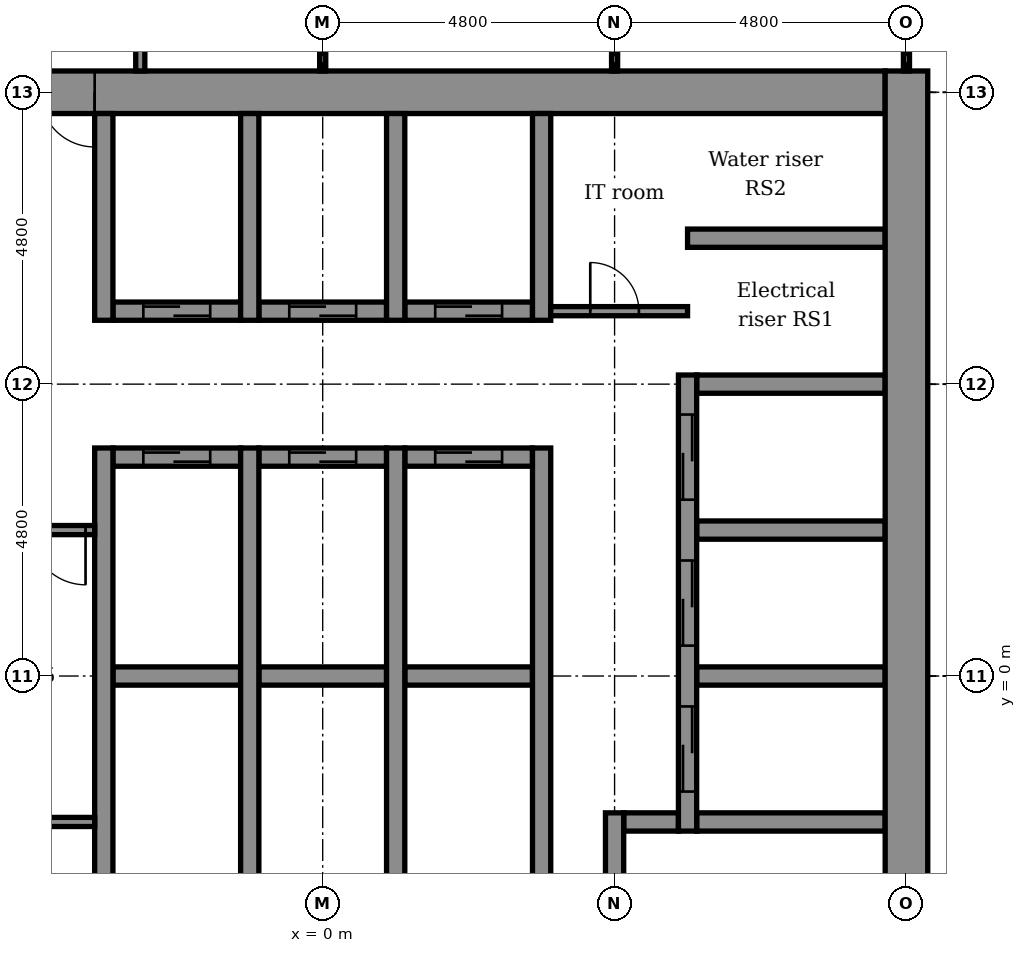
"""IFC4 building model, lengths in metres.
Left out: names, types, materials, properties, quantities, classifications, styles, units other than length and angle.
Written with IfcOpenShell. Run it as: python <this file> out.ifc"""

import sys

from ifc_helpers import new_model, si_unit, direction, frame, frame_2d, origin, place, context, subcontext, project, spatial, rectangle, extrude, element, fill, save


model = new_model("IFC4")
c1 = context("Model", 3, precision=1e-05, world=origin(), true_north=direction((0.0, 1.0)))
c2 = subcontext(c1, "Body", "Model", "MODEL_VIEW")
j1 = project(units=[si_unit("LENGTHUNIT", "METRE"), si_unit("PLANEANGLEUNIT", "RADIAN")], contexts=[c1])
p1 = place(None, origin())
s1 = spatial("IfcSite", under=j1, at=p1, CompositionType="ELEMENT")
p2 = place(p1, origin())
s2 = spatial("IfcBuilding", under=s1, at=p2, CompositionType="ELEMENT")
p3 = place(p2, frame((0.0, 0.0, 212.9)))
s3 = spatial("IfcBuildingStorey", under=s2, at=p3, CompositionType="ELEMENT", Elevation=212.9)
p4 = place(p3, frame((4.95, -2.4, -0.15), z_axis=(0.0, 0.0, 1.0), x_axis=(1.0, 0.0, 0.0)))
e1 = element("IfcWall", 1, at=p4, inside=s3, PredefinedType="STANDARD", context=c2, shape_type="SweptSolid", body=[
    extrude(rectangle(XDim=0.9, YDim=0.3, at=frame_2d((0.45, 0.0))), origin(), (0.0, 0.0, 1.0), 3.75),
])
p5 = place(p3, frame((6.15, -2.4, -0.15), z_axis=(0.0, 0.0, 1.0), x_axis=(1.0, 0.0, 0.0)))
e2 = element("IfcWall", 2, at=p5, inside=s3, PredefinedType="STANDARD", context=c2, shape_type="SweptSolid", body=[
    extrude(rectangle(XDim=3.1, YDim=0.3, at=frame_2d((1.55, 0.0))), origin(), (0.0, 0.0, 1.0), 3.75),
])
p6 = place(p3, frame((-3.45, 0.0, -0.15), z_axis=(0.0, 0.0, 1.0), x_axis=(1.0, 0.0, 0.0)))
e3 = element("IfcWall", 3, at=p6, inside=s3, PredefinedType="STANDARD", context=c2, shape_type="SweptSolid", body=[
    extrude(rectangle(XDim=2.1, YDim=0.3, at=frame_2d((1.05, 0.0))), origin(), (0.0, 0.0, 1.0), 3.75),
])
p7 = place(p3, frame((-1.05, 0.0, -0.15), z_axis=(0.0, 0.0, 1.0), x_axis=(1.0, 0.0, 0.0)))
e4 = element("IfcWall", 4, at=p7, inside=s3, PredefinedType="STANDARD", context=c2, shape_type="SweptSolid", body=[
    extrude(rectangle(XDim=2.1, YDim=0.3, at=frame_2d((1.05, 0.0))), origin(), (0.0, 0.0, 1.0), 3.75),
])
p8 = place(p3, frame((1.35, 0.0, -0.15), z_axis=(0.0, 0.0, 1.0), x_axis=(1.0, 0.0, 0.0)))
e5 = element("IfcWall", 5, at=p8, inside=s3, PredefinedType="STANDARD", context=c2, shape_type="SweptSolid", body=[
    extrude(rectangle(XDim=2.1, YDim=0.3, at=frame_2d((1.05, 0.0))), origin(), (0.0, 0.0, 1.0), 3.75),
])
for number, where, z_axis, x_axis in (
    (6, (6.15, 0.0, -0.15), (0.0, 0.0, 1.0), (1.0, 0.0, 0.0)),
    (7, (6.15, 2.4, -0.15), (0.0, 0.0, 1.0), (1.0, 0.0, 0.0)),
):
    element("IfcWall", number, at=place(p3, frame(where, z_axis=z_axis, x_axis=x_axis)), inside=s3, PredefinedType="STANDARD", context=c2, shape_type="SweptSolid", body=[
        extrude(rectangle(XDim=3.1, YDim=0.3, at=frame_2d((1.55, 0.0))), origin(), (0.0, 0.0, 1.0), 3.75),
    ])
p9 = place(p3, frame((-3.45, 3.6, -0.15), z_axis=(0.0, 0.0, 1.0), x_axis=(1.0, 0.0, 0.0)))
e8 = element("IfcWall", 8, at=p9, inside=s3, PredefinedType="STANDARD", context=c2, shape_type="SweptSolid", body=[
    extrude(rectangle(XDim=2.1, YDim=0.3, at=frame_2d((1.05, 0.0))), origin(), (0.0, 0.0, 1.0), 3.75),
])
p10 = place(p9, frame((0.5, 0.0, 0.15)))
e9 = element("IfcOpeningElement", 9, at=p10, cuts=e8, PredefinedType="OPENING", context=c2, shape_type="SweptSolid", body=[
    extrude(rectangle(XDim=1.1, YDim=2.1, at=frame_2d((0.55, 1.05))), frame((0.0, 0.16, 0.0), z_axis=(0.0, -1.0, 0.0), x_axis=(1.0, 0.0, 0.0)), (0.0, 0.0, 1.0), 0.32),
])
p11 = place(p3, frame((-1.05, 3.6, -0.15), z_axis=(0.0, 0.0, 1.0), x_axis=(1.0, 0.0, 0.0)))
e10 = element("IfcWall", 10, at=p11, inside=s3, PredefinedType="STANDARD", context=c2, shape_type="SweptSolid", body=[
    extrude(rectangle(XDim=2.1, YDim=0.3, at=frame_2d((1.05, 0.0))), origin(), (0.0, 0.0, 1.0), 3.75),
])
p12 = place(p11, frame((0.5, 0.0, 0.15)))
e11 = element("IfcOpeningElement", 11, at=p12, cuts=e10, PredefinedType="OPENING", context=c2, shape_type="SweptSolid", body=[
    extrude(rectangle(XDim=1.1, YDim=2.1, at=frame_2d((0.55, 1.05))), frame((0.0, 0.16, 0.0), z_axis=(0.0, -1.0, 0.0), x_axis=(1.0, 0.0, 0.0)), (0.0, 0.0, 1.0), 0.32),
])
p13 = place(p3, frame((1.35, 3.6, -0.15), z_axis=(0.0, 0.0, 1.0), x_axis=(1.0, 0.0, 0.0)))
e12 = element("IfcWall", 12, at=p13, inside=s3, PredefinedType="STANDARD", context=c2, shape_type="SweptSolid", body=[
    extrude(rectangle(XDim=2.1, YDim=0.3, at=frame_2d((1.05, 0.0))), origin(), (0.0, 0.0, 1.0), 3.75),
])
p14 = place(p13, frame((0.5, 0.0, 0.15)))
e13 = element("IfcOpeningElement", 13, at=p14, cuts=e12, PredefinedType="OPENING", context=c2, shape_type="SweptSolid", body=[
    extrude(rectangle(XDim=1.1, YDim=2.1, at=frame_2d((0.55, 1.05))), frame((0.0, 0.16, 0.0), z_axis=(0.0, -1.0, 0.0), x_axis=(1.0, 0.0, 0.0)), (0.0, 0.0, 1.0), 0.32),
])
p15 = place(p3, frame((6.15, 4.8, -0.15), z_axis=(0.0, 0.0, 1.0), x_axis=(1.0, 0.0, 0.0)))
e14 = element("IfcWall", 14, at=p15, inside=s3, PredefinedType="STANDARD", context=c2, shape_type="SweptSolid", body=[
    extrude(rectangle(XDim=3.1, YDim=0.3, at=frame_2d((1.55, 0.0))), origin(), (0.0, 0.0, 1.0), 3.75),
])
p16 = place(p3, frame((-3.45, 6.0, -0.15), z_axis=(0.0, 0.0, 1.0), x_axis=(1.0, 0.0, 0.0)))
e15 = element("IfcWall", 15, at=p16, inside=s3, PredefinedType="STANDARD", context=c2, shape_type="SweptSolid", body=[
    extrude(rectangle(XDim=2.1, YDim=0.3, at=frame_2d((1.05, 0.0))), origin(), (0.0, 0.0, 1.0), 3.75),
])
p17 = place(p16, frame((0.5, 0.0, 0.15)))
e16 = element("IfcOpeningElement", 16, at=p17, cuts=e15, PredefinedType="OPENING", context=c2, shape_type="SweptSolid", body=[
    extrude(rectangle(XDim=1.1, YDim=2.1, at=frame_2d((0.55, 1.05))), frame((0.0, 0.16, 0.0), z_axis=(0.0, -1.0, 0.0), x_axis=(1.0, 0.0, 0.0)), (0.0, 0.0, 1.0), 0.32),
])
p18 = place(p3, frame((-1.05, 6.0, -0.15), z_axis=(0.0, 0.0, 1.0), x_axis=(1.0, 0.0, 0.0)))
e17 = element("IfcWall", 17, at=p18, inside=s3, PredefinedType="STANDARD", context=c2, shape_type="SweptSolid", body=[
    extrude(rectangle(XDim=2.1, YDim=0.3, at=frame_2d((1.05, 0.0))), origin(), (0.0, 0.0, 1.0), 3.75),
])
p19 = place(p18, frame((0.5, 0.0, 0.15)))
e18 = element("IfcOpeningElement", 18, at=p19, cuts=e17, PredefinedType="OPENING", context=c2, shape_type="SweptSolid", body=[
    extrude(rectangle(XDim=1.1, YDim=2.1, at=frame_2d((0.55, 1.05))), frame((0.0, 0.16, 0.0), z_axis=(0.0, -1.0, 0.0), x_axis=(1.0, 0.0, 0.0)), (0.0, 0.0, 1.0), 0.32),
])
p20 = place(p3, frame((1.35, 6.0, -0.15), z_axis=(0.0, 0.0, 1.0), x_axis=(1.0, 0.0, 0.0)))
e19 = element("IfcWall", 19, at=p20, inside=s3, PredefinedType="STANDARD", context=c2, shape_type="SweptSolid", body=[
    extrude(rectangle(XDim=2.1, YDim=0.3, at=frame_2d((1.05, 0.0))), origin(), (0.0, 0.0, 1.0), 3.75),
])
p21 = place(p20, frame((0.5, 0.0, 0.15)))
e20 = element("IfcOpeningElement", 20, at=p21, cuts=e19, PredefinedType="OPENING", context=c2, shape_type="SweptSolid", body=[
    extrude(rectangle(XDim=1.1, YDim=2.1, at=frame_2d((0.55, 1.05))), frame((0.0, 0.16, 0.0), z_axis=(0.0, -1.0, 0.0), x_axis=(1.0, 0.0, 0.0)), (0.0, 0.0, 1.0), 0.32),
])
p22 = place(p3, frame((6.0, 7.2, -0.15), z_axis=(0.0, 0.0, 1.0), x_axis=(1.0, 0.0, 0.0)))
e21 = element("IfcWall", 21, at=p22, inside=s3, PredefinedType="STANDARD", context=c2, shape_type="SweptSolid", body=[
    extrude(rectangle(XDim=3.25, YDim=0.3, at=frame_2d((1.625, 0.0))), origin(), (0.0, 0.0, 1.0), 3.75),
])
p23 = place(p3, frame((-5.25, 9.6, -0.15), z_axis=(0.0, 0.0, 1.0), x_axis=(1.0, 0.0, 0.0)))
e22 = element("IfcWall", 22, at=p23, inside=s3, PredefinedType="SHEAR", context=c2, shape_type="SweptSolid", body=[
    extrude(rectangle(XDim=14.5, YDim=0.7, at=frame_2d((7.25, 0.0))), origin(), (0.0, 0.0, 1.0), 3.75),
])
p24 = place(p23, frame((0.6, 0.0, 0.15)))
e23 = element("IfcOpeningElement", 23, at=p24, cuts=e22, PredefinedType="OPENING", context=c2, shape_type="SweptSolid", body=[
    extrude(rectangle(XDim=0.9, YDim=2.1, at=frame_2d((0.45, 1.05))), frame((0.0, 0.36, 0.0), z_axis=(0.0, -1.0, 0.0), x_axis=(1.0, 0.0, 0.0)), (0.0, 0.0, 1.0), 0.72),
])
p25 = place(p3, frame((-3.6, -3.75, -0.15), z_axis=(0.0, 0.0, 1.0), x_axis=(0.0, 1.0, 0.0)))
e24 = element("IfcWall", 24, at=p25, inside=s3, PredefinedType="STANDARD", context=c2, shape_type="SweptSolid", body=[
    extrude(rectangle(XDim=7.5, YDim=0.3, at=frame_2d((3.75, 0.0))), origin(), (0.0, 0.0, 1.0), 3.75),
])
p26 = place(p3, frame((-3.6, 5.85, -0.15), z_axis=(0.0, 0.0, 1.0), x_axis=(0.0, 1.0, 0.0)))
e25 = element("IfcWall", 25, at=p26, inside=s3, PredefinedType="STANDARD", context=c2, shape_type="SweptSolid", body=[
    extrude(rectangle(XDim=3.4, YDim=0.3, at=frame_2d((1.7, 0.0))), origin(), (0.0, 0.0, 1.0), 3.75),
])
p27 = place(p3, frame((-1.2, -3.75, -0.15), z_axis=(0.0, 0.0, 1.0), x_axis=(0.0, 1.0, 0.0)))
e26 = element("IfcWall", 26, at=p27, inside=s3, PredefinedType="STANDARD", context=c2, shape_type="SweptSolid", body=[
    extrude(rectangle(XDim=7.5, YDim=0.3, at=frame_2d((3.75, 0.0))), origin(), (0.0, 0.0, 1.0), 3.75),
])
p28 = place(p3, frame((-1.2, 5.85, -0.15), z_axis=(0.0, 0.0, 1.0), x_axis=(0.0, 1.0, 0.0)))
e27 = element("IfcWall", 27, at=p28, inside=s3, PredefinedType="STANDARD", context=c2, shape_type="SweptSolid", body=[
    extrude(rectangle(XDim=3.4, YDim=0.3, at=frame_2d((1.7, 0.0))), origin(), (0.0, 0.0, 1.0), 3.75),
])
p29 = place(p3, frame((1.2, -3.75, -0.15), z_axis=(0.0, 0.0, 1.0), x_axis=(0.0, 1.0, 0.0)))
e28 = element("IfcWall", 28, at=p29, inside=s3, PredefinedType="STANDARD", context=c2, shape_type="SweptSolid", body=[
    extrude(rectangle(XDim=7.5, YDim=0.3, at=frame_2d((3.75, 0.0))), origin(), (0.0, 0.0, 1.0), 3.75),
])
p30 = place(p3, frame((1.2, 5.85, -0.15), z_axis=(0.0, 0.0, 1.0), x_axis=(0.0, 1.0, 0.0)))
e29 = element("IfcWall", 29, at=p30, inside=s3, PredefinedType="STANDARD", context=c2, shape_type="SweptSolid", body=[
    extrude(rectangle(XDim=3.4, YDim=0.3, at=frame_2d((1.7, 0.0))), origin(), (0.0, 0.0, 1.0), 3.75),
])
p31 = place(p3, frame((3.6, -3.75, -0.15), z_axis=(0.0, 0.0, 1.0), x_axis=(0.0, 1.0, 0.0)))
e30 = element("IfcWall", 30, at=p31, inside=s3, PredefinedType="STANDARD", context=c2, shape_type="SweptSolid", body=[
    extrude(rectangle(XDim=7.5, YDim=0.3, at=frame_2d((3.75, 0.0))), origin(), (0.0, 0.0, 1.0), 3.75),
])
p32 = place(p3, frame((3.6, 5.85, -0.15), z_axis=(0.0, 0.0, 1.0), x_axis=(0.0, 1.0, 0.0)))
e31 = element("IfcWall", 31, at=p32, inside=s3, PredefinedType="STANDARD", context=c2, shape_type="SweptSolid", body=[
    extrude(rectangle(XDim=3.4, YDim=0.3, at=frame_2d((1.7, 0.0))), origin(), (0.0, 0.0, 1.0), 3.75),
])
p33 = place(p3, frame((4.8, -9.25, -0.15), z_axis=(0.0, 0.0, 1.0), x_axis=(0.0, 1.0, 0.0)))
e32 = element("IfcWall", 32, at=p33, inside=s3, PredefinedType="STANDARD", context=c2, shape_type="SweptSolid", body=[
    extrude(rectangle(XDim=7.0, YDim=0.3, at=frame_2d((3.5, 0.0))), origin(), (0.0, 0.0, 1.0), 3.75),
])
p34 = place(p33, frame((3.8, 0.0, 0.15)))
e33 = element("IfcOpeningElement", 33, at=p34, cuts=e32, PredefinedType="OPENING", context=c2, shape_type="SweptSolid", body=[
    extrude(rectangle(XDim=1.2, YDim=2.1, at=frame_2d((0.6, 1.05))), frame((0.0, 0.16, 0.0), z_axis=(0.0, -1.0, 0.0), x_axis=(1.0, 0.0, 0.0)), (0.0, 0.0, 1.0), 0.32),
])
p35 = place(p3, frame((6.0, -2.55, -0.15), z_axis=(0.0, 0.0, 1.0), x_axis=(0.0, 1.0, 0.0)))
e34 = element("IfcWall", 34, at=p35, inside=s3, PredefinedType="STANDARD", context=c2, shape_type="SweptSolid", body=[
    extrude(rectangle(XDim=7.5, YDim=0.3, at=frame_2d((3.75, 0.0))), origin(), (0.0, 0.0, 1.0), 3.75),
])
p36 = place(p35, frame((0.65, 0.0, 0.15)))
e35 = element("IfcOpeningElement", 35, at=p36, cuts=e34, PredefinedType="OPENING", context=c2, shape_type="SweptSolid", body=[
    extrude(rectangle(XDim=1.4, YDim=2.1, at=frame_2d((0.7, 1.05))), frame((0.0, 0.16, 0.0), z_axis=(0.0, -1.0, 0.0), x_axis=(1.0, 0.0, 0.0)), (0.0, 0.0, 1.0), 0.32),
])
p37 = place(p35, frame((3.05, 0.0, 0.15)))
e36 = element("IfcOpeningElement", 36, at=p37, cuts=e34, PredefinedType="OPENING", context=c2, shape_type="SweptSolid", body=[
    extrude(rectangle(XDim=1.4, YDim=2.1, at=frame_2d((0.7, 1.05))), frame((0.0, 0.16, 0.0), z_axis=(0.0, -1.0, 0.0), x_axis=(1.0, 0.0, 0.0)), (0.0, 0.0, 1.0), 0.32),
])
p38 = place(p35, frame((5.45, 0.0, 0.15)))
e37 = element("IfcOpeningElement", 37, at=p38, cuts=e34, PredefinedType="OPENING", context=c2, shape_type="SweptSolid", body=[
    extrude(rectangle(XDim=1.4, YDim=2.1, at=frame_2d((0.7, 1.05))), frame((0.0, 0.16, 0.0), z_axis=(0.0, -1.0, 0.0), x_axis=(1.0, 0.0, 0.0)), (0.0, 0.0, 1.0), 0.32),
])
p39 = place(p3, frame((9.6, -10.15, -0.15), z_axis=(0.0, 0.0, 1.0), x_axis=(0.0, 1.0, 0.0)))
e38 = element("IfcWall", 38, at=p39, inside=s3, PredefinedType="SHEAR", context=c2, shape_type="SweptSolid", body=[
    extrude(rectangle(XDim=20.1, YDim=0.7, at=frame_2d((10.05, 0.0))), origin(), (0.0, 0.0, 1.0), 3.75),
])
for number, where, z_axis, x_axis in (
    (39, (9.6, 9.95, 0.0), (0.0, 0.0, 1.0), (0.0, 1.0, 0.0)),
    (40, (4.8, 9.95, 0.0), (0.0, 0.0, 1.0), (0.0, 1.0, 0.0)),
    (41, (0.0, 9.95, 0.0), (0.0, 0.0, 1.0), (0.0, 1.0, 0.0)),
):
    element("IfcWall", number, at=place(p3, frame(where, z_axis=z_axis, x_axis=x_axis)), inside=s3, PredefinedType="PARTITIONING", context=c2, shape_type="SweptSolid", body=[
        extrude(rectangle(XDim=4.85, YDim=0.1, at=frame_2d((2.425, 0.0))), origin(), (0.0, 0.0, 1.0), 2.838),
    ])
p40 = place(p3, frame((-3.0, 9.95, 0.0), z_axis=(0.0, 0.0, 1.0), x_axis=(0.0, 1.0, 0.0)))
e42 = element("IfcWall", 42, at=p40, inside=s3, PredefinedType="PARTITIONING", context=c2, shape_type="SweptSolid", body=[
    extrude(rectangle(XDim=4.85, YDim=0.15, at=frame_2d((2.425, 0.0))), origin(), (0.0, 0.0, 1.0), 3.6),
])
p41 = place(p40, frame((2.0, 0.0, 0.0)))
e43 = element("IfcOpeningElement", 43, at=p41, cuts=e42, PredefinedType="OPENING", context=c2, shape_type="SweptSolid", body=[
    extrude(rectangle(XDim=0.9, YDim=2.1, at=frame_2d((0.45, 1.05))), frame((0.0, 0.085, 0.0), z_axis=(0.0, -1.0, 0.0), x_axis=(1.0, 0.0, 0.0)), (0.0, 0.0, 1.0), 0.17),
])
p42 = place(p3, frame((3.75, 6.0, 0.0), z_axis=(0.0, 0.0, 1.0), x_axis=(1.0, 0.0, 0.0)))
e44 = element("IfcWall", 44, at=p42, inside=s3, PredefinedType="PARTITIONING", context=c2, shape_type="SweptSolid", body=[
    extrude(rectangle(XDim=2.25, YDim=0.15, at=frame_2d((1.125, 0.0))), origin(), (0.0, 0.0, 1.0), 3.6),
])
p43 = place(p42, frame((0.65, 0.0, 0.0)))
e45 = element("IfcOpeningElement", 45, at=p43, cuts=e44, PredefinedType="OPENING", context=c2, shape_type="SweptSolid", body=[
    extrude(rectangle(XDim=0.8, YDim=2.1, at=frame_2d((0.4, 1.05))), frame((0.0, 0.085, 0.0), z_axis=(0.0, -1.0, 0.0), x_axis=(1.0, 0.0, 0.0)), (0.0, 0.0, 1.0), 0.17),
])
p44 = place(p3, frame((-4.95, 2.4, 0.0), z_axis=(0.0, 0.0, 1.0), x_axis=(1.0, 0.0, 0.0)))
e46 = element("IfcWall", 46, at=p44, inside=s3, PredefinedType="PARTITIONING", context=c2, shape_type="SweptSolid", body=[
    extrude(rectangle(XDim=1.2, YDim=0.15, at=frame_2d((0.6, 0.0))), origin(), (0.0, 0.0, 1.0), 3.6),
])
p45 = place(p44, frame((0.15, 0.0, 0.0)))
e47 = element("IfcOpeningElement", 47, at=p45, cuts=e46, PredefinedType="OPENING", context=c2, shape_type="SweptSolid", body=[
    extrude(rectangle(XDim=0.9, YDim=2.1, at=frame_2d((0.45, 1.05))), frame((0.0, 0.085, 0.0), z_axis=(0.0, -1.0, 0.0), x_axis=(1.0, 0.0, 0.0)), (0.0, 0.0, 1.0), 0.17),
])
p46 = place(p3, frame((-4.95, -2.4, 0.0), z_axis=(0.0, 0.0, 1.0), x_axis=(1.0, 0.0, 0.0)))
e48 = element("IfcWall", 48, at=p46, inside=s3, PredefinedType="PARTITIONING", context=c2, shape_type="SweptSolid", body=[
    extrude(rectangle(XDim=1.2, YDim=0.15, at=frame_2d((0.6, 0.0))), origin(), (0.0, 0.0, 1.0), 3.6),
])
p47 = place(p43, origin())
e49 = element("IfcDoor", 49, at=p47, inside=s3, OperationType="SINGLE_SWING_LEFT", PredefinedType="DOOR", context=c2, shape_type="SweptSolid", body=[
    extrude(rectangle(XDim=0.8, YDim=2.1, at=frame_2d((0.4, 1.05))), frame((0.0, 0.025, 0.0), z_axis=(0.0, -1.0, 0.0), x_axis=(1.0, 0.0, 0.0)), (0.0, 0.0, 1.0), 0.05),
])
fill(e45, e49)
p48 = place(p36, origin())
e50 = element("IfcDoor", 50, at=p48, inside=s3, OperationType="DOUBLE_DOOR_SLIDING", PredefinedType="DOOR", context=c2, shape_type="SweptSolid", body=[
    extrude(rectangle(XDim=1.4, YDim=2.1, at=frame_2d((0.7, 1.05))), frame((0.0, 0.025, 0.0), z_axis=(0.0, -1.0, 0.0), x_axis=(1.0, 0.0, 0.0)), (0.0, 0.0, 1.0), 0.05),
])
fill(e35, e50)
p49 = place(p37, origin())
e51 = element("IfcDoor", 51, at=p49, inside=s3, OperationType="DOUBLE_DOOR_SLIDING", PredefinedType="DOOR", context=c2, shape_type="SweptSolid", body=[
    extrude(rectangle(XDim=1.4, YDim=2.1, at=frame_2d((0.7, 1.05))), frame((0.0, 0.025, 0.0), z_axis=(0.0, -1.0, 0.0), x_axis=(1.0, 0.0, 0.0)), (0.0, 0.0, 1.0), 0.05),
])
fill(e36, e51)
p50 = place(p38, origin())
e52 = element("IfcDoor", 52, at=p50, inside=s3, OperationType="DOUBLE_DOOR_SLIDING", PredefinedType="DOOR", context=c2, shape_type="SweptSolid", body=[
    extrude(rectangle(XDim=1.4, YDim=2.1, at=frame_2d((0.7, 1.05))), frame((0.0, 0.025, 0.0), z_axis=(0.0, -1.0, 0.0), x_axis=(1.0, 0.0, 0.0)), (0.0, 0.0, 1.0), 0.05),
])
fill(e37, e52)
p51 = place(p17, origin())
e53 = element("IfcDoor", 53, at=p51, inside=s3, OperationType="DOUBLE_DOOR_SLIDING", PredefinedType="DOOR", context=c2, shape_type="SweptSolid", body=[
    extrude(rectangle(XDim=1.1, YDim=2.1, at=frame_2d((0.55, 1.05))), frame((0.0, 0.025, 0.0), z_axis=(0.0, -1.0, 0.0), x_axis=(1.0, 0.0, 0.0)), (0.0, 0.0, 1.0), 0.05),
])
fill(e16, e53)
p52 = place(p19, origin())
e54 = element("IfcDoor", 54, at=p52, inside=s3, OperationType="DOUBLE_DOOR_SLIDING", PredefinedType="DOOR", context=c2, shape_type="SweptSolid", body=[
    extrude(rectangle(XDim=1.1, YDim=2.1, at=frame_2d((0.55, 1.05))), frame((0.0, 0.025, 0.0), z_axis=(0.0, -1.0, 0.0), x_axis=(1.0, 0.0, 0.0)), (0.0, 0.0, 1.0), 0.05),
])
fill(e18, e54)
p53 = place(p21, origin())
e55 = element("IfcDoor", 55, at=p53, inside=s3, OperationType="DOUBLE_DOOR_SLIDING", PredefinedType="DOOR", context=c2, shape_type="SweptSolid", body=[
    extrude(rectangle(XDim=1.1, YDim=2.1, at=frame_2d((0.55, 1.05))), frame((0.0, 0.025, 0.0), z_axis=(0.0, -1.0, 0.0), x_axis=(1.0, 0.0, 0.0)), (0.0, 0.0, 1.0), 0.05),
])
fill(e20, e55)
p54 = place(p10, origin())
e56 = element("IfcDoor", 56, at=p54, inside=s3, OperationType="DOUBLE_DOOR_SLIDING", PredefinedType="DOOR", context=c2, shape_type="SweptSolid", body=[
    extrude(rectangle(XDim=1.1, YDim=2.1, at=frame_2d((0.55, 1.05))), frame((0.0, 0.025, 0.0), z_axis=(0.0, -1.0, 0.0), x_axis=(1.0, 0.0, 0.0)), (0.0, 0.0, 1.0), 0.05),
])
fill(e9, e56)
p55 = place(p12, origin())
e57 = element("IfcDoor", 57, at=p55, inside=s3, OperationType="DOUBLE_DOOR_SLIDING", PredefinedType="DOOR", context=c2, shape_type="SweptSolid", body=[
    extrude(rectangle(XDim=1.1, YDim=2.1, at=frame_2d((0.55, 1.05))), frame((0.0, 0.025, 0.0), z_axis=(0.0, -1.0, 0.0), x_axis=(1.0, 0.0, 0.0)), (0.0, 0.0, 1.0), 0.05),
])
fill(e11, e57)
p56 = place(p14, origin())
e58 = element("IfcDoor", 58, at=p56, inside=s3, OperationType="DOUBLE_DOOR_SLIDING", PredefinedType="DOOR", context=c2, shape_type="SweptSolid", body=[
    extrude(rectangle(XDim=1.1, YDim=2.1, at=frame_2d((0.55, 1.05))), frame((0.0, 0.025, 0.0), z_axis=(0.0, -1.0, 0.0), x_axis=(1.0, 0.0, 0.0)), (0.0, 0.0, 1.0), 0.05),
])
fill(e13, e58)
p57 = place(p24, frame((0.9, 0.0, 0.0), z_axis=(0.0, 0.0, 1.0), x_axis=(-1.0, 0.0, 0.0)))
e59 = element("IfcDoor", 59, at=p57, inside=s3, OperationType="SINGLE_SWING_RIGHT", PredefinedType="DOOR", context=c2, shape_type="SweptSolid", body=[
    extrude(rectangle(XDim=0.9, YDim=2.1, at=frame_2d((0.45, 1.05))), frame((0.0, 0.025, 0.0), z_axis=(0.0, -1.0, 0.0), x_axis=(1.0, 0.0, 0.0)), (0.0, 0.0, 1.0), 0.05),
])
fill(e23, e59)
p58 = place(p45, frame((0.9, 0.0, 0.0), z_axis=(0.0, 0.0, 1.0), x_axis=(-1.0, 0.0, 0.0)))
e60 = element("IfcDoor", 60, at=p58, inside=s3, OperationType="SINGLE_SWING_RIGHT", PredefinedType="DOOR", context=c2, shape_type="SweptSolid", body=[
    extrude(rectangle(XDim=0.9, YDim=2.1, at=frame_2d((0.45, 1.05))), frame((0.0, 0.025, 0.0), z_axis=(0.0, -1.0, 0.0), x_axis=(1.0, 0.0, 0.0)), (0.0, 0.0, 1.0), 0.05),
])
fill(e47, e60)
save(model, sys.argv[1])
